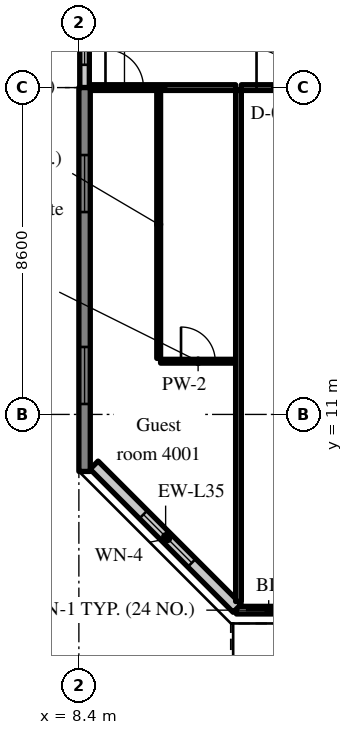
"""IFC4 building model, lengths in metres.
Left out: names, types, materials, properties, quantities, classifications, styles, units other than length and angle.
Written with IfcOpenShell. Run it as: python <this file> out.ifc"""

import sys

from ifc_helpers import new_model, si_unit, direction, frame, frame_2d, origin, place, context, subcontext, project, spatial, rectangle, extrude, source, transform, mapped, element, fill, save


model = new_model("IFC4")
c1 = context("Model", 3, precision=1e-05, world=origin(), true_north=direction((0.0, 1.0)))
c2 = subcontext(c1, "Body", "Model", "MODEL_VIEW")
j1 = project(units=[si_unit("LENGTHUNIT", "METRE"), si_unit("PLANEANGLEUNIT", "RADIAN")], contexts=[c1])
p1 = place(None, origin())
s1 = spatial("IfcSite", under=j1, at=p1, CompositionType="ELEMENT")
p2 = place(p1, origin())
s2 = spatial("IfcBuilding", under=s1, at=p2, CompositionType="ELEMENT")
p3 = place(p2, frame((0.0, 0.0, 166.8)))
s3 = spatial("IfcBuildingStorey", under=s2, at=p3, CompositionType="ELEMENT", Elevation=166.8)
m1 = source(origin(), c2, "Body", "SweptSolid", [
    extrude(rectangle(XDim=10.1, YDim=0.3, at=frame_2d((5.05, 0.0))), origin(), (0.0, 0.0, 1.0), 3.52),
])
p4 = place(p3, frame((8.55, 9.5, 0.0), z_axis=(0.0, 0.0, 1.0), x_axis=(0.0, 1.0, 0.0)))
e1 = element("IfcWall", 1, at=p4, inside=s3, PredefinedType="SHEAR", context=c2, shape_type="MappedRepresentation", body=[
    mapped(m1, transform((0.0, 0.0, 0.0), scale=1.0)),
])
m2 = source(origin(), c2, "Body", "SweptSolid", [
    extrude(rectangle(XDim=1.5, YDim=1.5, at=frame_2d((0.75, 0.75))), frame((0.0, 0.16, 0.0), z_axis=(0.0, -1.0, 0.0), x_axis=(1.0, 0.0, 0.0)), (0.0, 0.0, 1.0), 0.32),
])
p5 = place(p4, frame((1.775, 0.0, 0.9)))
e2 = element("IfcOpeningElement", 2, at=p5, cuts=e1, PredefinedType="OPENING", context=c2, shape_type="MappedRepresentation", body=[
    mapped(m2, transform((0.0, 0.0, 0.0), scale=1.0)),
])
p6 = place(p4, frame((6.825, 0.0, 0.9)))
e3 = element("IfcOpeningElement", 3, at=p6, cuts=e1, PredefinedType="OPENING", context=c2, shape_type="MappedRepresentation", body=[
    mapped(m2, transform((0.0, 0.0, 0.0), scale=1.0)),
])
m3 = source(origin(), c2, "Body", "SweptSolid", [
    extrude(rectangle(XDim=4.105, YDim=0.2, at=frame_2d((2.052, 0.0))), origin(), (0.0, 0.0, 1.0), 2.87),
])
p7 = place(p3, frame((12.545, 5.85, 0.0), z_axis=(0.0, 0.0, 1.0), x_axis=(1.0, 0.0, 0.0)))
e4 = element("IfcWall", 4, at=p7, inside=s3, PredefinedType="SOLIDWALL", context=c2, shape_type="MappedRepresentation", body=[
    mapped(m3, transform((0.0, 0.0, 0.0), scale=1.0)),
])
m4 = source(origin(), c2, "Body", "SweptSolid", [
    extrude(rectangle(XDim=1.2, YDim=2.4, at=frame_2d((0.6, 1.2))), frame((0.0, 0.11, 0.0), z_axis=(0.0, -1.0, 0.0), x_axis=(1.0, 0.0, 0.0)), (0.0, 0.0, 1.0), 0.22),
])
p8 = place(p7, frame((0.25, 0.0, 0.0)))
e5 = element("IfcOpeningElement", 5, at=p8, cuts=e4, PredefinedType="OPENING", context=c2, shape_type="MappedRepresentation", body=[
    mapped(m4, transform((0.0, 0.0, 0.0), scale=1.0)),
])
m5 = source(origin(), c2, "Body", "SweptSolid", [
    extrude(rectangle(XDim=1.5, YDim=1.5, at=frame_2d((0.75, 0.75))), frame((0.0, 0.11, 0.0), z_axis=(0.0, -1.0, 0.0), x_axis=(1.0, 0.0, 0.0)), (0.0, 0.0, 1.0), 0.22),
])
p9 = place(p7, frame((2.355, 0.0, 0.9)))
e6 = element("IfcOpeningElement", 6, at=p9, cuts=e4, PredefinedType="OPENING", context=c2, shape_type="MappedRepresentation", body=[
    mapped(m5, transform((0.0, 0.0, 0.0), scale=1.0)),
])
m6 = source(origin(), c2, "Body", "SweptSolid", [
    extrude(rectangle(XDim=5.326, YDim=0.3, at=frame_2d((2.663, 0.0))), origin(), (0.0, 0.0, 1.0), 3.52),
])
p10 = place(p3, frame((8.8, 9.666, 0.0), z_axis=(0.0, 0.0, 1.0), x_axis=(0.707083859269, -0.707129702361, 0.0)))
e7 = element("IfcWall", 7, at=p10, inside=s3, PredefinedType="SOLIDWALL", context=c2, shape_type="MappedRepresentation", body=[
    mapped(m6, transform((0.0, 0.0, 0.0), scale=1.0)),
])
m7 = source(origin(), c2, "Body", "SweptSolid", [
    extrude(rectangle(XDim=1.8, YDim=1.5, at=frame_2d((0.9, 0.75))), frame((0.0, 0.16, 0.0), z_axis=(0.0, -1.0, 0.0), x_axis=(1.0, 0.0, 0.0)), (0.0, 0.0, 1.0), 0.32),
])
p11 = place(p10, frame((1.836, 0.0, 0.9)))
e8 = element("IfcOpeningElement", 8, at=p11, cuts=e7, PredefinedType="OPENING", context=c2, shape_type="MappedRepresentation", body=[
    mapped(m7, transform((0.0, 0.0, 0.0), scale=1.0)),
])
m8 = source(origin(), c2, "Body", "SweptSolid", [
    extrude(rectangle(XDim=2.4, YDim=0.25, at=frame_2d((1.2, 0.0))), origin(), (0.0, 0.0, 1.0), 2.62),
])
p12 = place(p3, frame((8.55, 19.6, 0.0), z_axis=(0.0, 0.0, 1.0), x_axis=(0.0, 1.0, 0.0)))
e9 = element("IfcWall", 9, at=p12, inside=s3, PredefinedType="SOLIDWALL", context=c2, shape_type="MappedRepresentation", body=[
    mapped(m8, transform((0.0, 0.0, 0.0), scale=1.0)),
])
m9 = source(origin(), c2, "Body", "SweptSolid", [
    extrude(rectangle(XDim=1.2, YDim=1.5, at=frame_2d((0.6, 0.75))), frame((0.0, 0.135, 0.0), z_axis=(0.0, -1.0, 0.0), x_axis=(1.0, 0.0, 0.0)), (0.0, 0.0, 1.0), 0.27),
])
p13 = place(p12, frame((0.6, 0.0, 0.9)))
e10 = element("IfcOpeningElement", 10, at=p13, cuts=e9, PredefinedType="OPENING", context=c2, shape_type="MappedRepresentation", body=[
    mapped(m9, transform((0.0, 0.0, 0.0), scale=1.0)),
])
m10 = source(origin(), c2, "Body", "SweptSolid", [
    extrude(rectangle(XDim=7.05, YDim=0.1, at=frame_2d((3.525, 0.0))), origin(), (0.0, 0.0, 1.0), 3.52),
])
p14 = place(p3, frame((10.5, 12.475, 0.0), z_axis=(0.0, 0.0, 1.0), x_axis=(0.0, 1.0, 0.0)))
e11 = element("IfcWall", 11, at=p14, inside=s3, PredefinedType="PARTITIONING", context=c2, shape_type="MappedRepresentation", body=[
    mapped(m10, transform((0.0, 0.0, 0.0), scale=1.0)),
])
m11 = source(origin(), c2, "Body", "SweptSolid", [
    extrude(rectangle(XDim=1.975, YDim=0.1, at=frame_2d((0.987, 0.0))), origin(), (0.0, 0.0, 1.0), 3.52),
])
p15 = place(p3, frame((10.55, 12.4, 0.0), z_axis=(0.0, 0.0, 1.0), x_axis=(1.0, 0.0, 0.0)))
e12 = element("IfcWall", 12, at=p15, inside=s3, PredefinedType="PARTITIONING", context=c2, shape_type="MappedRepresentation", body=[
    mapped(m11, transform((0.0, 0.0, 0.0), scale=1.0)),
])
m12 = source(origin(), c2, "Body", "SweptSolid", [
    extrude(rectangle(XDim=0.9, YDim=2.1, at=frame_2d((0.45, 1.05))), frame((0.0, 0.06, 0.0), z_axis=(0.0, -1.0, 0.0), x_axis=(1.0, 0.0, 0.0)), (0.0, 0.0, 1.0), 0.12),
])
p16 = place(p15, frame((0.538, 0.0, 0.0)))
e13 = element("IfcOpeningElement", 13, at=p16, cuts=e12, PredefinedType="OPENING", context=c2, shape_type="MappedRepresentation", body=[
    mapped(m12, transform((0.0, 0.0, 0.0), scale=1.0)),
])
m13 = source(origin(), c2, "Body", "SweptSolid", [
    extrude(rectangle(XDim=3.825, YDim=0.15, at=frame_2d((1.913, 0.0))), origin(), (0.0, 0.0, 1.0), 2.82),
])
p17 = place(p3, frame((8.7, 19.6, 0.0), z_axis=(0.0, 0.0, 1.0), x_axis=(1.0, 0.0, 0.0)))
e14 = element("IfcWall", 14, at=p17, inside=s3, PredefinedType="PARTITIONING", context=c2, shape_type="MappedRepresentation", body=[
    mapped(m13, transform((0.0, 0.0, 0.0), scale=1.0)),
])
m14 = source(origin(), c2, "Body", "SweptSolid", [
    extrude(rectangle(XDim=1.0, YDim=2.1, at=frame_2d((0.5, 1.05))), frame((0.0, 0.085, 0.0), z_axis=(0.0, -1.0, 0.0), x_axis=(1.0, 0.0, 0.0)), (0.0, 0.0, 1.0), 0.17),
])
p18 = place(p17, frame((0.4, 0.0, 0.0)))
e15 = element("IfcOpeningElement", 15, at=p18, cuts=e14, PredefinedType="OPENING", context=c2, shape_type="MappedRepresentation", body=[
    mapped(m14, transform((0.0, 0.0, 0.0), scale=1.0)),
])
m15 = source(origin(), c2, "Body", "SweptSolid", [
    extrude(rectangle(XDim=3.975, YDim=0.15, at=frame_2d((1.987, 0.0))), origin(), (0.0, 0.0, 1.0), 2.82),
])
p19 = place(p3, frame((12.675, 19.6, 0.0), z_axis=(0.0, 0.0, 1.0), x_axis=(1.0, 0.0, 0.0)))
e16 = element("IfcWall", 16, at=p19, inside=s3, PredefinedType="PARTITIONING", context=c2, shape_type="MappedRepresentation", body=[
    mapped(m15, transform((0.0, 0.0, 0.0), scale=1.0)),
])
p20 = place(p19, frame((0.4, 0.0, 0.0)))
e17 = element("IfcOpeningElement", 17, at=p20, cuts=e16, PredefinedType="OPENING", context=c2, shape_type="MappedRepresentation", body=[
    mapped(m14, transform((0.0, 0.0, 0.0), scale=1.0)),
])
m16 = source(origin(), c2, "Body", "SweptSolid", [
    extrude(rectangle(XDim=13.447, YDim=0.15, at=frame_2d((6.724, 0.0))), origin(), (0.0, 0.0, 1.0), 3.52),
])
p21 = place(p3, frame((12.6, 6.078, 0.0), z_axis=(0.0, 0.0, 1.0), x_axis=(0.0, 1.0, 0.0)))
e18 = element("IfcWall", 18, at=p21, inside=s3, PredefinedType="PARTITIONING", context=c2, shape_type="MappedRepresentation", body=[
    mapped(m16, transform((0.0, 0.0, 0.0), scale=1.0)),
])
m17 = source(origin(), c2, "Body", "SweptSolid", [
    extrude(rectangle(XDim=1.2, YDim=2.4, at=frame_2d((0.6, 1.2))), frame((0.0, 0.025, 0.0), z_axis=(0.0, -1.0, 0.0), x_axis=(1.0, 0.0, 0.0)), (0.0, 0.0, 1.0), 0.05),
])
p22 = place(p8, origin())
e19 = element("IfcDoor", 19, at=p22, inside=s3, OperationType="SLIDING_TO_LEFT", PredefinedType="DOOR", context=c2, shape_type="MappedRepresentation", body=[
    mapped(m17, transform((0.0, 0.0, 0.0), scale=1.0)),
])
fill(e5, e19)
m18 = source(origin(), c2, "Body", "SweptSolid", [
    extrude(rectangle(XDim=1.8, YDim=1.5, at=frame_2d((0.9, 0.75))), frame((0.0, 0.03, 0.0), z_axis=(0.0, -1.0, 0.0), x_axis=(1.0, 0.0, 0.0)), (0.0, 0.0, 1.0), 0.06),
])
p23 = place(p11, origin())
e20 = element("IfcWindow", 20, at=p23, inside=s3, PartitioningType="SINGLE_PANEL", PredefinedType="WINDOW", context=c2, shape_type="MappedRepresentation", body=[
    mapped(m18, transform((0.0, 0.0, 0.0), scale=1.0)),
])
fill(e8, e20)
m19 = source(origin(), c2, "Body", "SweptSolid", [
    extrude(rectangle(XDim=1.5, YDim=1.5, at=frame_2d((0.75, 0.75))), frame((0.0, 0.03, 0.0), z_axis=(0.0, -1.0, 0.0), x_axis=(1.0, 0.0, 0.0)), (0.0, 0.0, 1.0), 0.06),
])
p24 = place(p5, origin())
e21 = element("IfcWindow", 21, at=p24, inside=s3, PartitioningType="SINGLE_PANEL", PredefinedType="WINDOW", context=c2, shape_type="MappedRepresentation", body=[
    mapped(m19, transform((0.0, 0.0, 0.0), scale=1.0)),
])
fill(e2, e21)
p25 = place(p6, origin())
e22 = element("IfcWindow", 22, at=p25, inside=s3, PartitioningType="SINGLE_PANEL", PredefinedType="WINDOW", context=c2, shape_type="MappedRepresentation", body=[
    mapped(m19, transform((0.0, 0.0, 0.0), scale=1.0)),
])
fill(e3, e22)
m20 = source(origin(), c2, "Body", "SweptSolid", [
    extrude(rectangle(XDim=1.2, YDim=1.5, at=frame_2d((0.6, 0.75))), frame((0.0, 0.03, 0.0), z_axis=(0.0, -1.0, 0.0), x_axis=(1.0, 0.0, 0.0)), (0.0, 0.0, 1.0), 0.06),
])
p26 = place(p13, origin())
e23 = element("IfcWindow", 23, at=p26, inside=s3, PartitioningType="SINGLE_PANEL", PredefinedType="WINDOW", context=c2, shape_type="MappedRepresentation", body=[
    mapped(m20, transform((0.0, 0.0, 0.0), scale=1.0)),
])
fill(e10, e23)
m21 = source(origin(), c2, "Body", "SweptSolid", [
    extrude(rectangle(XDim=0.9, YDim=2.1, at=frame_2d((0.45, 1.05))), frame((0.0, 0.025, 0.0), z_axis=(0.0, -1.0, 0.0), x_axis=(1.0, 0.0, 0.0)), (0.0, 0.0, 1.0), 0.05),
])
p27 = place(p16, origin())
e24 = element("IfcDoor", 24, at=p27, inside=s3, OperationType="SINGLE_SWING_LEFT", PredefinedType="DOOR", context=c2, shape_type="MappedRepresentation", body=[
    mapped(m21, transform((0.0, 0.0, 0.0), scale=1.0)),
])
fill(e13, e24)
m22 = source(origin(), c2, "Body", "SweptSolid", [
    extrude(rectangle(XDim=1.0, YDim=2.1, at=frame_2d((0.5, 1.05))), frame((0.0, 0.025, 0.0), z_axis=(0.0, -1.0, 0.0), x_axis=(1.0, 0.0, 0.0)), (0.0, 0.0, 1.0), 0.05),
])
p28 = place(p18, origin())
e25 = element("IfcDoor", 25, at=p28, inside=s3, OperationType="SINGLE_SWING_LEFT", PredefinedType="DOOR", context=c2, shape_type="MappedRepresentation", body=[
    mapped(m22, transform((0.0, 0.0, 0.0), scale=1.0)),
])
fill(e15, e25)
p29 = place(p20, origin())
e26 = element("IfcDoor", 26, at=p29, inside=s3, OperationType="SINGLE_SWING_LEFT", PredefinedType="DOOR", context=c2, shape_type="MappedRepresentation", body=[
    mapped(m22, transform((0.0, 0.0, 0.0), scale=1.0)),
])
fill(e17, e26)
save(model, sys.argv[1])
